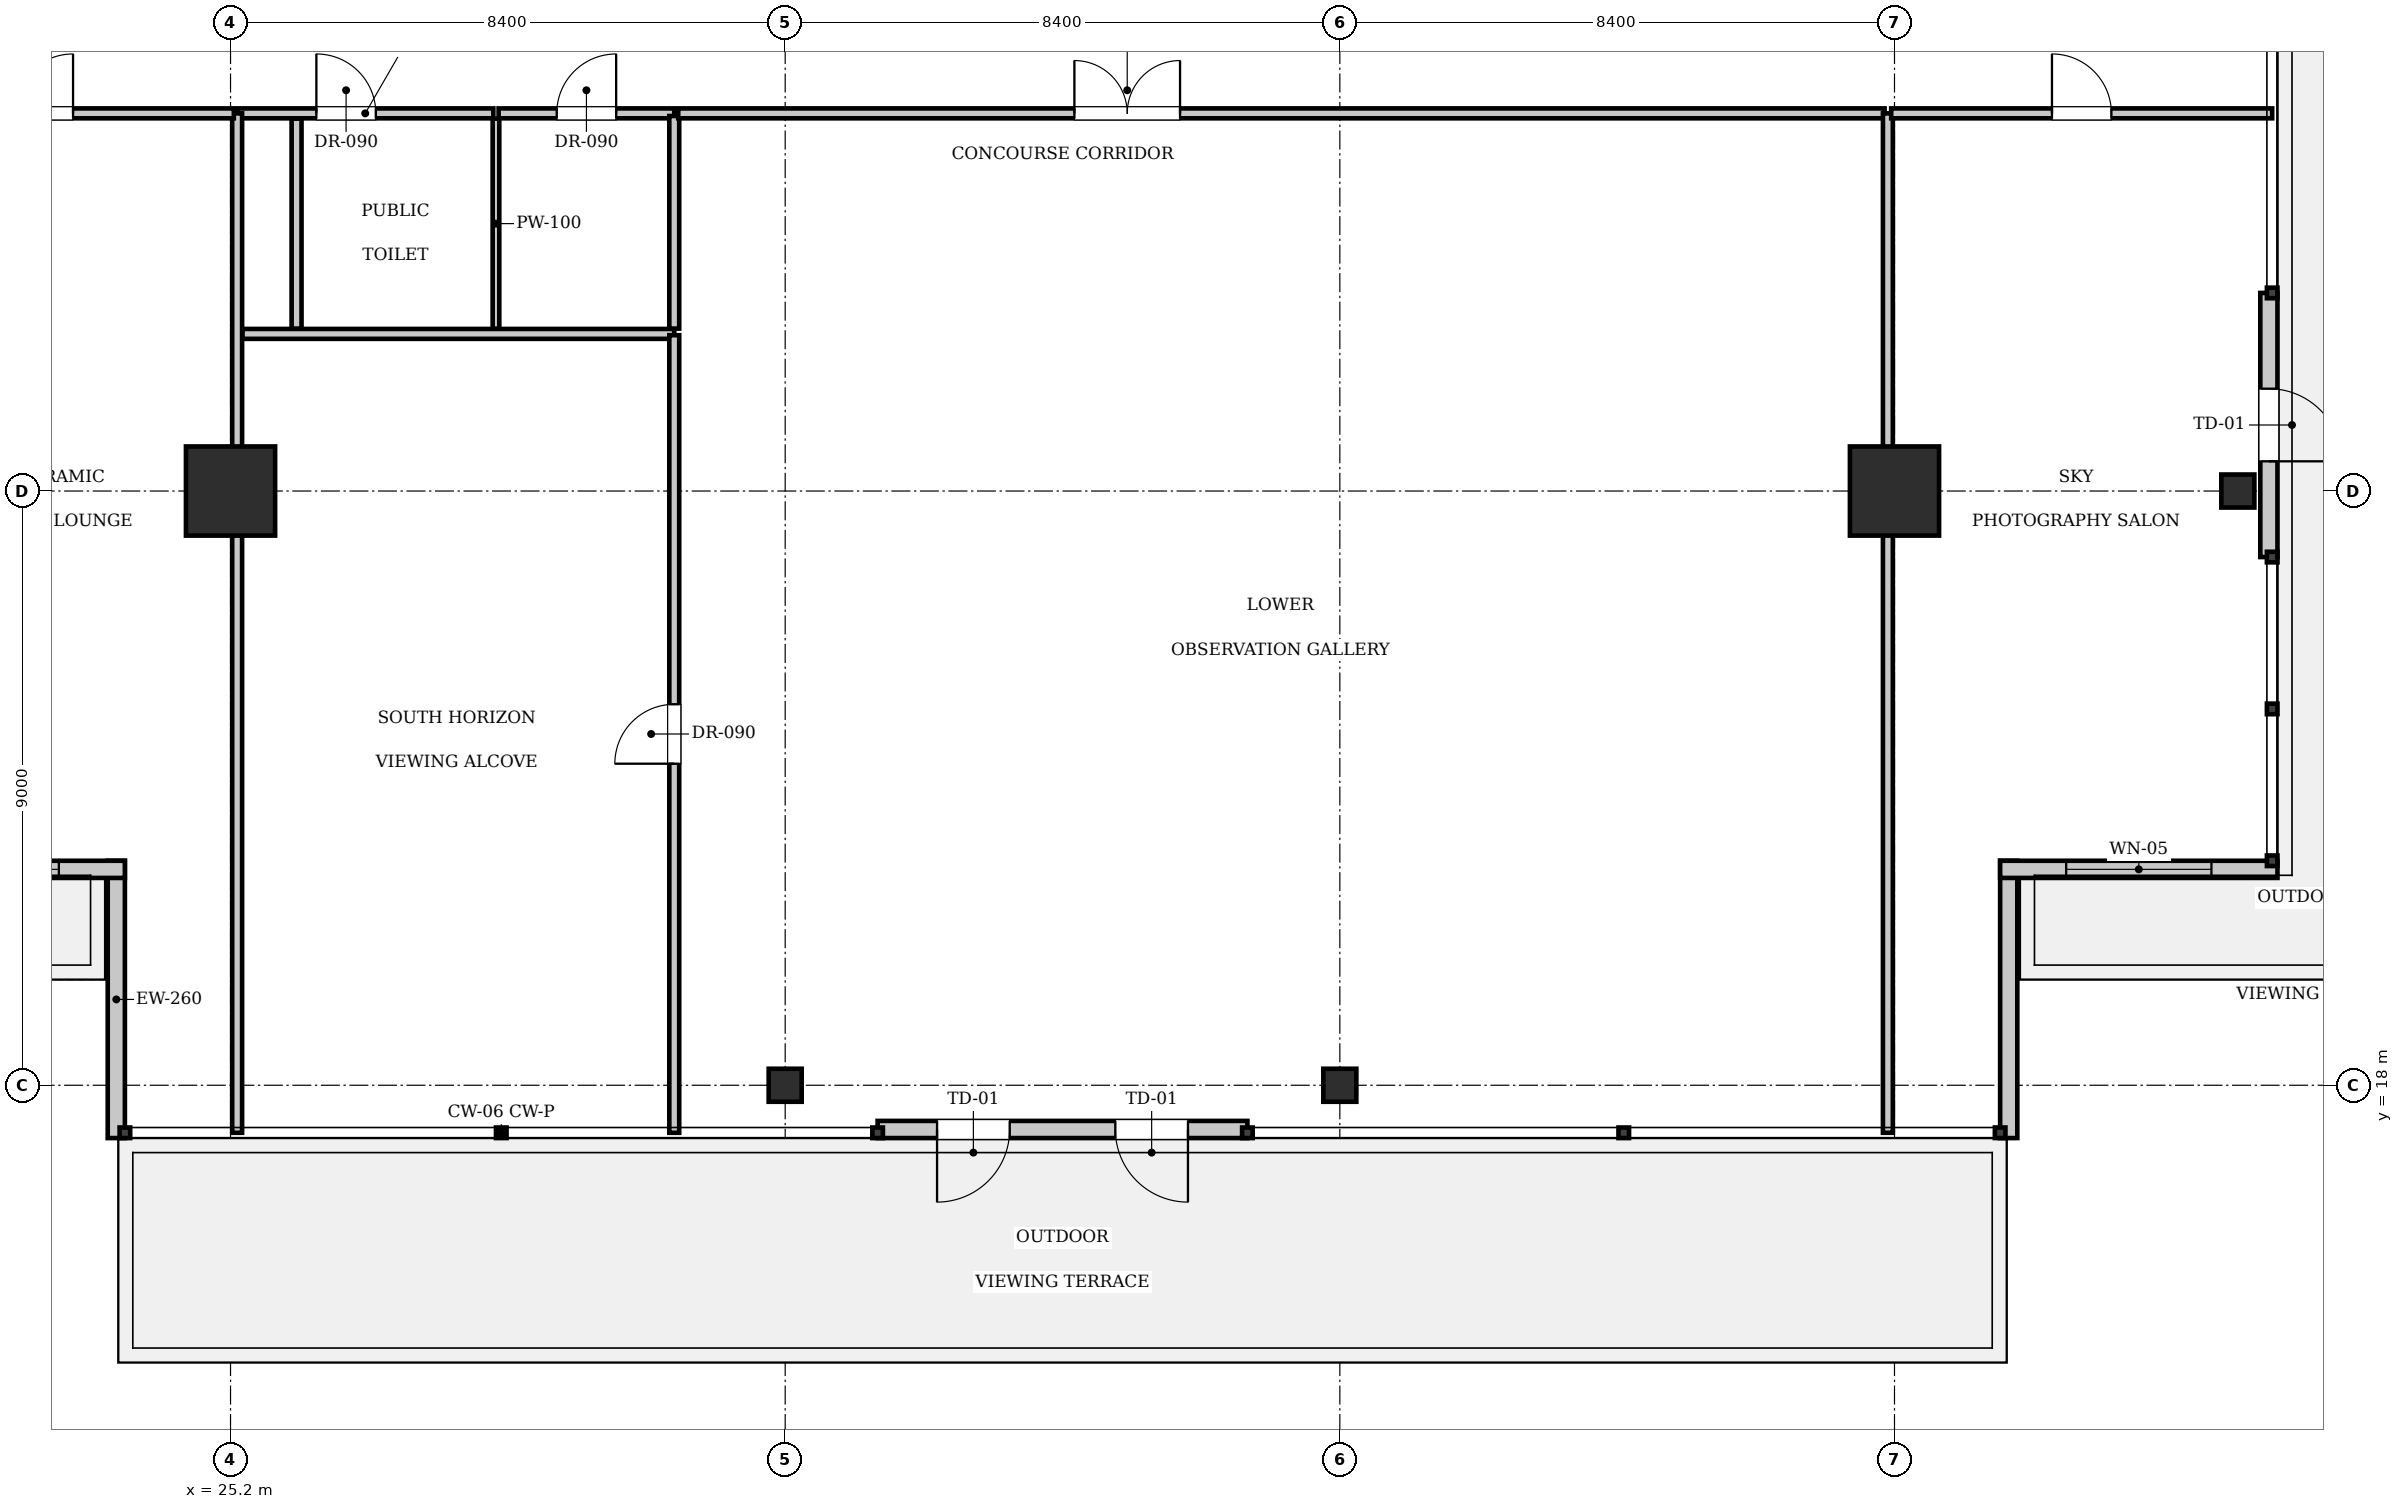
"""IFC4 building model, lengths in metres.
Left out: names, types, materials, properties, quantities, classifications, styles, units other than length and angle.
Written with IfcOpenShell. Run it as: python <this file> out.ifc"""

import sys

from ifc_helpers import new_model, si_unit, direction, frame, frame_2d, origin, origin_2d, place, context, subcontext, project, spatial, rectangle, i_section, extrude, element, fill, save


model = new_model("IFC4")
c1 = context("Model", 3, precision=1e-05, world=origin(), true_north=direction((0.0, 1.0)))
c2 = subcontext(c1, "Body", "Model", "MODEL_VIEW")
j1 = project(units=[si_unit("LENGTHUNIT", "METRE"), si_unit("PLANEANGLEUNIT", "RADIAN")], contexts=[c1])
p1 = place(None, origin())
s1 = spatial("IfcSite", under=j1, at=p1, CompositionType="ELEMENT")
p2 = place(p1, origin())
s2 = spatial("IfcBuilding", under=s1, at=p2, CompositionType="ELEMENT")
p3 = place(p2, frame((0.0, 0.0, 354.2)))
s3 = spatial("IfcBuildingStorey", under=s2, at=p3, CompositionType="ELEMENT", Elevation=354.2)
for number, where, z_axis, x_axis in (
    (1, (25.2, 27.0, 0.0), (0.0, 0.0, 1.0), (1.0, 0.0, 0.0)),
    (2, (50.4, 27.0, 0.0), (0.0, 0.0, 1.0), (1.0, 0.0, 0.0)),
):
    element("IfcColumn", number, at=place(p3, frame(where, z_axis=z_axis, x_axis=x_axis)), inside=s3, PredefinedType="COLUMN", context=c2, shape_type="SweptSolid", body=[
        extrude(rectangle(XDim=1.35, YDim=1.35, at=origin_2d()), origin(), (0.0, 0.0, 1.0), 4.9),
    ])
for number, where, z_axis, x_axis in (
    (3, (33.6, 18.0, 0.0), (0.0, 0.0, 1.0), (1.0, 0.0, 0.0)),
    (4, (42.0, 18.0, 0.0), (0.0, 0.0, 1.0), (1.0, 0.0, 0.0)),
):
    element("IfcColumn", number, at=place(p3, frame(where, z_axis=z_axis, x_axis=x_axis)), inside=s3, PredefinedType="COLUMN", context=c2, shape_type="SweptSolid", body=[
        extrude(i_section(OverallWidth=0.5, OverallDepth=0.5, WebThickness=0.022, FlangeThickness=0.032, at=origin_2d()), origin(), (0.0, 0.0, 1.0), 4.9),
    ])
p4 = place(p3, frame((55.6, 27.0, -0.26), z_axis=(0.0, 0.0, 1.0), x_axis=(1.0, 0.0, 0.0)))
e5 = element("IfcColumn", 5, at=p4, inside=s3, PredefinedType="COLUMN", context=c2, shape_type="SweptSolid", body=[
    extrude(i_section(OverallWidth=0.5, OverallDepth=0.5, WebThickness=0.022, FlangeThickness=0.032, at=origin_2d()), origin(), (0.0, 0.0, 1.0), 5.16),
])
p5 = place(p3, frame((23.47, 17.2, 0.0), z_axis=(0.0, 0.0, 1.0), x_axis=(0.0, 1.0, 0.0)))
e6 = element("IfcWall", 6, at=p5, inside=s3, PredefinedType="SOLIDWALL", context=c2, shape_type="SweptSolid", body=[
    extrude(rectangle(XDim=4.2, YDim=0.26, at=frame_2d((2.1, 0.0))), origin(), (0.0, 0.0, 1.0), 4.64),
])
p6 = place(p3, frame((23.6, 21.27, 0.0), z_axis=(0.0, 0.0, 1.0), x_axis=(-1.0, 0.0, 0.0)))
e7 = element("IfcWall", 7, at=p6, inside=s3, PredefinedType="SOLIDWALL", context=c2, shape_type="SweptSolid", body=[
    extrude(rectangle(XDim=4.2, YDim=0.26, at=frame_2d((2.1, 0.0))), origin(), (0.0, 0.0, 1.0), 4.64),
])
p7 = place(p6, frame((1.0, 0.0, 0.9)))
e8 = element("IfcOpeningElement", 8, at=p7, cuts=e7, PredefinedType="OPENING", context=c2, shape_type="SweptSolid", body=[
    extrude(rectangle(XDim=2.2, YDim=2.8, at=frame_2d((1.1, 1.4))), frame((0.0, 0.14, 0.0), z_axis=(0.0, -1.0, 0.0), x_axis=(1.0, 0.0, 0.0)), (0.0, 0.0, 1.0), 0.28),
])
p8 = place(p3, frame((52.13, 21.4, 0.0), z_axis=(0.0, 0.0, 1.0), x_axis=(0.0, -1.0, 0.0)))
e9 = element("IfcWall", 9, at=p8, inside=s3, PredefinedType="SOLIDWALL", context=c2, shape_type="SweptSolid", body=[
    extrude(rectangle(XDim=4.2, YDim=0.26, at=frame_2d((2.1, 0.0))), origin(), (0.0, 0.0, 1.0), 4.64),
])
p9 = place(p3, frame((56.2, 21.27, 0.0), z_axis=(0.0, 0.0, 1.0), x_axis=(-1.0, 0.0, 0.0)))
e10 = element("IfcWall", 10, at=p9, inside=s3, PredefinedType="SOLIDWALL", context=c2, shape_type="SweptSolid", body=[
    extrude(rectangle(XDim=4.2, YDim=0.26, at=frame_2d((2.1, 0.0))), origin(), (0.0, 0.0, 1.0), 4.64),
])
p10 = place(p9, frame((1.0, 0.0, 0.9)))
e11 = element("IfcOpeningElement", 11, at=p10, cuts=e10, PredefinedType="OPENING", context=c2, shape_type="SweptSolid", body=[
    extrude(rectangle(XDim=2.2, YDim=2.8, at=frame_2d((1.1, 1.4))), frame((0.0, 0.14, 0.0), z_axis=(0.0, -1.0, 0.0), x_axis=(1.0, 0.0, 0.0)), (0.0, 0.0, 1.0), 0.28),
])
p11 = place(p3, frame((40.6, 17.33, 0.0), z_axis=(0.0, 0.0, 1.0), x_axis=(-1.0, 0.0, 0.0)))
e12 = element("IfcWall", 12, at=p11, inside=s3, PredefinedType="SOLIDWALL", context=c2, shape_type="SweptSolid", body=[
    extrude(rectangle(XDim=5.6, YDim=0.26, at=frame_2d((2.8, 0.0))), origin(), (0.0, 0.0, 1.0), 4.64),
])
p12 = place(p11, frame((0.9, 0.0, 0.0)))
e13 = element("IfcOpeningElement", 13, at=p12, cuts=e12, PredefinedType="OPENING", context=c2, shape_type="SweptSolid", body=[
    extrude(rectangle(XDim=1.1, YDim=2.2, at=frame_2d((0.55, 1.1))), frame((0.0, 0.14, 0.0), z_axis=(0.0, -1.0, 0.0), x_axis=(1.0, 0.0, 0.0)), (0.0, 0.0, 1.0), 0.28),
])
p13 = place(p11, frame((3.6, 0.0, 0.0)))
e14 = element("IfcOpeningElement", 14, at=p13, cuts=e12, PredefinedType="OPENING", context=c2, shape_type="SweptSolid", body=[
    extrude(rectangle(XDim=1.1, YDim=2.2, at=frame_2d((0.55, 1.1))), frame((0.0, 0.14, 0.0), z_axis=(0.0, -1.0, 0.0), x_axis=(1.0, 0.0, 0.0)), (0.0, 0.0, 1.0), 0.28),
])
p14 = place(p3, frame((56.07, 26.0, 0.0), z_axis=(0.0, 0.0, 1.0), x_axis=(0.0, 1.0, 0.0)))
e15 = element("IfcWall", 15, at=p14, inside=s3, PredefinedType="SOLIDWALL", context=c2, shape_type="SweptSolid", body=[
    extrude(rectangle(XDim=4.0, YDim=0.26, at=frame_2d((2.0, 0.0))), origin(), (0.0, 0.0, 1.0), 4.64),
])
p15 = place(p14, frame((1.45, 0.0, 0.0)))
e16 = element("IfcOpeningElement", 16, at=p15, cuts=e15, PredefinedType="OPENING", context=c2, shape_type="SweptSolid", body=[
    extrude(rectangle(XDim=1.1, YDim=2.2, at=frame_2d((0.55, 1.1))), frame((0.0, 0.14, 0.0), z_axis=(0.0, -1.0, 0.0), x_axis=(1.0, 0.0, 0.0)), (0.0, 0.0, 1.0), 0.28),
])
p16 = place(p3, frame((25.3, 32.72, 0.0), z_axis=(0.0, 0.0, 1.0), x_axis=(1.0, 0.0, 0.0)))
e17 = element("IfcWall", 17, at=p16, inside=s3, PredefinedType="PARTITIONING", context=c2, shape_type="SweptSolid", body=[
    extrude(rectangle(XDim=3.88, YDim=0.15, at=frame_2d((1.94, 0.0))), origin(), (0.0, 0.0, 1.0), 4.64),
])
p17 = place(p16, frame((1.2, 0.0, 0.0)))
e18 = element("IfcOpeningElement", 18, at=p17, cuts=e17, PredefinedType="OPENING", context=c2, shape_type="SweptSolid", body=[
    extrude(rectangle(XDim=0.9, YDim=2.1, at=frame_2d((0.45, 1.05))), frame((0.0, 0.085, 0.0), z_axis=(0.0, -1.0, 0.0), x_axis=(1.0, 0.0, 0.0)), (0.0, 0.0, 1.0), 0.17),
])
p18 = place(p3, frame((29.26, 32.72, 0.0), z_axis=(0.0, 0.0, 1.0), x_axis=(1.0, 0.0, 0.0)))
e19 = element("IfcWall", 19, at=p18, inside=s3, PredefinedType="PARTITIONING", context=c2, shape_type="SweptSolid", body=[
    extrude(rectangle(XDim=2.66, YDim=0.15, at=frame_2d((1.33, 0.0))), origin(), (0.0, 0.0, 1.0), 4.64),
])
p19 = place(p18, frame((0.88, 0.0, 0.0)))
e20 = element("IfcOpeningElement", 20, at=p19, cuts=e19, PredefinedType="OPENING", context=c2, shape_type="SweptSolid", body=[
    extrude(rectangle(XDim=0.9, YDim=2.1, at=frame_2d((0.45, 1.05))), frame((0.0, 0.085, 0.0), z_axis=(0.0, -1.0, 0.0), x_axis=(1.0, 0.0, 0.0)), (0.0, 0.0, 1.0), 0.17),
])
p20 = place(p3, frame((25.38, 29.38, 0.0), z_axis=(0.0, 0.0, 1.0), x_axis=(1.0, 0.0, 0.0)))
e21 = element("IfcWall", 21, at=p20, inside=s3, PredefinedType="PARTITIONING", context=c2, shape_type="SweptSolid", body=[
    extrude(rectangle(XDim=6.54, YDim=0.15, at=frame_2d((3.27, 0.0))), origin(), (0.0, 0.0, 1.0), 4.64),
])
p21 = place(p3, frame((26.2, 29.46, 0.0), z_axis=(0.0, 0.0, 1.0), x_axis=(0.0, 1.0, 0.0)))
e22 = element("IfcWall", 22, at=p21, inside=s3, PredefinedType="PARTITIONING", context=c2, shape_type="SweptSolid", body=[
    extrude(rectangle(XDim=3.18, YDim=0.15, at=frame_2d((1.59, 0.0))), origin(), (0.0, 0.0, 1.0), 4.64),
])
p22 = place(p3, frame((29.22, 29.46, 0.0), z_axis=(0.0, 0.0, 1.0), x_axis=(0.0, 1.0, 0.0)))
e23 = element("IfcWall", 23, at=p22, inside=s3, PredefinedType="PARTITIONING", context=c2, shape_type="SweptSolid", body=[
    extrude(rectangle(XDim=3.18, YDim=0.1, at=frame_2d((1.59, 0.0))), origin(), (0.0, 0.0, 1.0), 4.64),
])
p23 = place(p3, frame((31.92, 29.46, 0.0), z_axis=(0.0, 0.0, 1.0), x_axis=(0.0, 1.0, 0.0)))
e24 = element("IfcWall", 24, at=p23, inside=s3, PredefinedType="PARTITIONING", context=c2, shape_type="SweptSolid", body=[
    extrude(rectangle(XDim=3.22, YDim=0.15, at=frame_2d((1.61, 0.0))), origin(), (0.0, 0.0, 1.0), 4.64),
])
p24 = place(p3, frame((31.98, 32.72, 0.0), z_axis=(0.0, 0.0, 1.0), x_axis=(1.0, 0.0, 0.0)))
e25 = element("IfcWall", 25, at=p24, inside=s3, PredefinedType="PARTITIONING", context=c2, shape_type="SweptSolid", body=[
    extrude(rectangle(XDim=18.27, YDim=0.15, at=frame_2d((9.135, 0.0))), origin(), (0.0, 0.0, 1.0), 4.64),
])
p25 = place(p24, frame((6.0, 0.0, 0.0)))
e26 = element("IfcOpeningElement", 26, at=p25, cuts=e25, PredefinedType="OPENING", context=c2, shape_type="SweptSolid", body=[
    extrude(rectangle(XDim=1.6, YDim=2.3, at=frame_2d((0.8, 1.15))), frame((0.0, 0.085, 0.0), z_axis=(0.0, -1.0, 0.0), x_axis=(1.0, 0.0, 0.0)), (0.0, 0.0, 1.0), 0.17),
])
p26 = place(p3, frame((31.92, 17.28, 0.0), z_axis=(0.0, 0.0, 1.0), x_axis=(0.0, 1.0, 0.0)))
e27 = element("IfcWall", 27, at=p26, inside=s3, PredefinedType="PARTITIONING", context=c2, shape_type="SweptSolid", body=[
    extrude(rectangle(XDim=12.08, YDim=0.15, at=frame_2d((6.04, 0.0))), origin(), (0.0, 0.0, 1.0), 4.64),
])
p27 = place(p26, frame((5.59, 0.0, 0.0)))
e28 = element("IfcOpeningElement", 28, at=p27, cuts=e27, PredefinedType="OPENING", context=c2, shape_type="SweptSolid", body=[
    extrude(rectangle(XDim=0.9, YDim=2.1, at=frame_2d((0.45, 1.05))), frame((0.0, 0.085, 0.0), z_axis=(0.0, -1.0, 0.0), x_axis=(1.0, 0.0, 0.0)), (0.0, 0.0, 1.0), 0.17),
])
for number, where, z_axis, x_axis in (
    (29, (25.3, 17.28, 0.0), (0.0, 0.0, 1.0), (0.0, 1.0, 0.0)),
    (30, (50.3, 17.28, 0.0), (0.0, 0.0, 1.0), (0.0, 1.0, 0.0)),
):
    element("IfcWall", number, at=place(p3, frame(where, z_axis=z_axis, x_axis=x_axis)), inside=s3, PredefinedType="PARTITIONING", context=c2, shape_type="SweptSolid", body=[
        extrude(rectangle(XDim=15.44, YDim=0.15, at=frame_2d((7.72, 0.0))), origin(), (0.0, 0.0, 1.0), 4.177),
    ])
p28 = place(p3, frame((19.48, 32.72, 0.0), z_axis=(0.0, 0.0, 1.0), x_axis=(1.0, 0.0, 0.0)))
e31 = element("IfcWall", 31, at=p28, inside=s3, PredefinedType="PARTITIONING", context=c2, shape_type="SweptSolid", body=[
    extrude(rectangle(XDim=5.77, YDim=0.15, at=frame_2d((2.885, 0.0))), origin(), (0.0, 0.0, 1.0), 4.64),
])
p29 = place(p28, frame((2.435, 0.0, 0.0)))
e32 = element("IfcOpeningElement", 32, at=p29, cuts=e31, PredefinedType="OPENING", context=c2, shape_type="SweptSolid", body=[
    extrude(rectangle(XDim=0.9, YDim=2.1, at=frame_2d((0.45, 1.05))), frame((0.0, 0.085, 0.0), z_axis=(0.0, -1.0, 0.0), x_axis=(1.0, 0.0, 0.0)), (0.0, 0.0, 1.0), 0.17),
])
p30 = place(p3, frame((50.35, 32.72, 0.0), z_axis=(0.0, 0.0, 1.0), x_axis=(1.0, 0.0, 0.0)))
e33 = element("IfcWall", 33, at=p30, inside=s3, PredefinedType="PARTITIONING", context=c2, shape_type="SweptSolid", body=[
    extrude(rectangle(XDim=5.77, YDim=0.15, at=frame_2d((2.885, 0.0))), origin(), (0.0, 0.0, 1.0), 4.64),
])
p31 = place(p30, frame((2.435, 0.0, 0.0)))
e34 = element("IfcOpeningElement", 34, at=p31, cuts=e33, PredefinedType="OPENING", context=c2, shape_type="SweptSolid", body=[
    extrude(rectangle(XDim=0.9, YDim=2.1, at=frame_2d((0.45, 1.05))), frame((0.0, 0.085, 0.0), z_axis=(0.0, -1.0, 0.0), x_axis=(1.0, 0.0, 0.0)), (0.0, 0.0, 1.0), 0.17),
])
p32 = place(p7, origin())
e35 = element("IfcWindow", 35, at=p32, inside=s3, PartitioningType="SINGLE_PANEL", PredefinedType="WINDOW", context=c2, shape_type="SweptSolid", body=[
    extrude(rectangle(XDim=2.2, YDim=2.8, at=frame_2d((1.1, 1.4))), frame((0.0, 0.03, 0.0), z_axis=(0.0, -1.0, 0.0), x_axis=(1.0, 0.0, 0.0)), (0.0, 0.0, 1.0), 0.06),
])
fill(e8, e35)
p33 = place(p10, origin())
e36 = element("IfcWindow", 36, at=p33, inside=s3, PartitioningType="SINGLE_PANEL", PredefinedType="WINDOW", context=c2, shape_type="SweptSolid", body=[
    extrude(rectangle(XDim=2.2, YDim=2.8, at=frame_2d((1.1, 1.4))), frame((0.0, 0.03, 0.0), z_axis=(0.0, -1.0, 0.0), x_axis=(1.0, 0.0, 0.0)), (0.0, 0.0, 1.0), 0.06),
])
fill(e11, e36)
p34 = place(p12, origin())
e37 = element("IfcDoor", 37, at=p34, inside=s3, OperationType="SINGLE_SWING_LEFT", PredefinedType="DOOR", context=c2, shape_type="SweptSolid", body=[
    extrude(rectangle(XDim=1.1, YDim=2.2, at=frame_2d((0.55, 1.1))), frame((0.0, 0.025, 0.0), z_axis=(0.0, -1.0, 0.0), x_axis=(1.0, 0.0, 0.0)), (0.0, 0.0, 1.0), 0.05),
])
fill(e13, e37)
p35 = place(p13, origin())
e38 = element("IfcDoor", 38, at=p35, inside=s3, OperationType="SINGLE_SWING_RIGHT", PredefinedType="DOOR", context=c2, shape_type="SweptSolid", body=[
    extrude(rectangle(XDim=1.1, YDim=2.2, at=frame_2d((0.55, 1.1))), frame((0.0, 0.025, 0.0), z_axis=(0.0, -1.0, 0.0), x_axis=(1.0, 0.0, 0.0)), (0.0, 0.0, 1.0), 0.05),
])
fill(e14, e38)
p36 = place(p15, frame((1.1, 0.0, 0.0), z_axis=(0.0, 0.0, 1.0), x_axis=(-1.0, 0.0, 0.0)))
e39 = element("IfcDoor", 39, at=p36, inside=s3, OperationType="SINGLE_SWING_RIGHT", PredefinedType="DOOR", context=c2, shape_type="SweptSolid", body=[
    extrude(rectangle(XDim=1.1, YDim=2.2, at=frame_2d((0.55, 1.1))), frame((0.0, 0.025, 0.0), z_axis=(0.0, -1.0, 0.0), x_axis=(1.0, 0.0, 0.0)), (0.0, 0.0, 1.0), 0.05),
])
fill(e16, e39)
p37 = place(p17, origin())
e40 = element("IfcDoor", 40, at=p37, inside=s3, OperationType="SINGLE_SWING_LEFT", PredefinedType="DOOR", context=c2, shape_type="SweptSolid", body=[
    extrude(rectangle(XDim=0.9, YDim=2.1, at=frame_2d((0.45, 1.05))), frame((0.0, 0.025, 0.0), z_axis=(0.0, -1.0, 0.0), x_axis=(1.0, 0.0, 0.0)), (0.0, 0.0, 1.0), 0.05),
])
fill(e18, e40)
p38 = place(p19, origin())
e41 = element("IfcDoor", 41, at=p38, inside=s3, OperationType="SINGLE_SWING_RIGHT", PredefinedType="DOOR", context=c2, shape_type="SweptSolid", body=[
    extrude(rectangle(XDim=0.9, YDim=2.1, at=frame_2d((0.45, 1.05))), frame((0.0, 0.025, 0.0), z_axis=(0.0, -1.0, 0.0), x_axis=(1.0, 0.0, 0.0)), (0.0, 0.0, 1.0), 0.05),
])
fill(e20, e41)
p39 = place(p25, origin())
e42 = element("IfcDoor", 42, at=p39, inside=s3, OperationType="DOUBLE_DOOR_SINGLE_SWING", PredefinedType="DOOR", context=c2, shape_type="SweptSolid", body=[
    extrude(rectangle(XDim=1.6, YDim=2.3, at=frame_2d((0.8, 1.15))), frame((0.0, 0.025, 0.0), z_axis=(0.0, -1.0, 0.0), x_axis=(1.0, 0.0, 0.0)), (0.0, 0.0, 1.0), 0.05),
])
fill(e26, e42)
p40 = place(p27, origin())
e43 = element("IfcDoor", 43, at=p40, inside=s3, OperationType="SINGLE_SWING_LEFT", PredefinedType="DOOR", context=c2, shape_type="SweptSolid", body=[
    extrude(rectangle(XDim=0.9, YDim=2.1, at=frame_2d((0.45, 1.05))), frame((0.0, 0.025, 0.0), z_axis=(0.0, -1.0, 0.0), x_axis=(1.0, 0.0, 0.0)), (0.0, 0.0, 1.0), 0.05),
])
fill(e28, e43)
p41 = place(p29, origin())
e44 = element("IfcDoor", 44, at=p41, inside=s3, OperationType="SINGLE_SWING_RIGHT", PredefinedType="DOOR", context=c2, shape_type="SweptSolid", body=[
    extrude(rectangle(XDim=0.9, YDim=2.1, at=frame_2d((0.45, 1.05))), frame((0.0, 0.025, 0.0), z_axis=(0.0, -1.0, 0.0), x_axis=(1.0, 0.0, 0.0)), (0.0, 0.0, 1.0), 0.05),
])
fill(e32, e44)
p42 = place(p31, origin())
e45 = element("IfcDoor", 45, at=p42, inside=s3, OperationType="SINGLE_SWING_LEFT", PredefinedType="DOOR", context=c2, shape_type="SweptSolid", body=[
    extrude(rectangle(XDim=0.9, YDim=2.1, at=frame_2d((0.45, 1.05))), frame((0.0, 0.025, 0.0), z_axis=(0.0, -1.0, 0.0), x_axis=(1.0, 0.0, 0.0)), (0.0, 0.0, 1.0), 0.05),
])
fill(e34, e45)
save(model, sys.argv[1])
